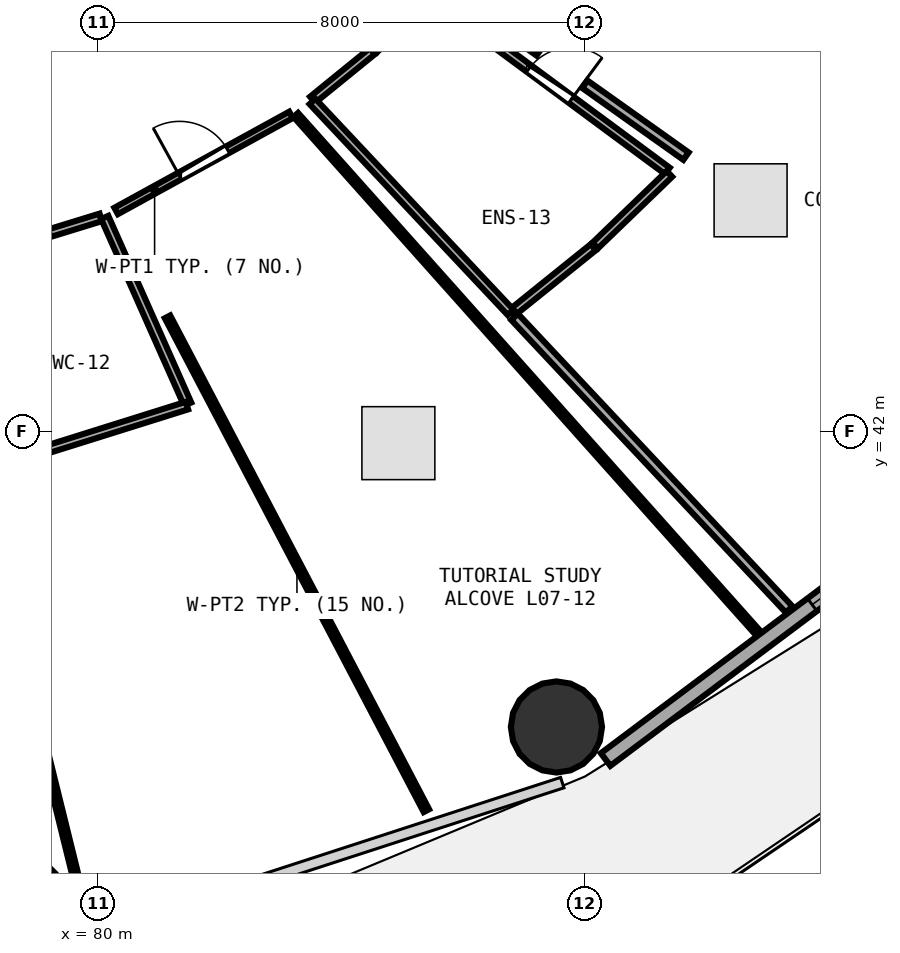
"""IFC4 building model, lengths in metres.
Left out: names, types, materials, properties, quantities, classifications, styles, units other than length and angle.
Written with IfcOpenShell. Run it as: python <this file> out.ifc"""

import sys

from ifc_helpers import new_model, si_unit, direction, frame, frame_2d, origin, origin_2d, place, context, subcontext, project, spatial, rectangle, circle, extrude, element, fill, save


model = new_model("IFC4")
c1 = context("Model", 3, precision=1e-05, world=origin(), true_north=direction((0.0, 1.0)))
c2 = subcontext(c1, "Body", "Model", "MODEL_VIEW")
j1 = project(units=[si_unit("LENGTHUNIT", "METRE"), si_unit("PLANEANGLEUNIT", "RADIAN")], contexts=[c1])
p1 = place(None, origin())
s1 = spatial("IfcSite", under=j1, at=p1, CompositionType="ELEMENT")
p2 = place(p1, origin())
s2 = spatial("IfcBuilding", under=s1, at=p2, CompositionType="ELEMENT")
p3 = place(p2, frame((0.0, 0.0, 30.0)))
s3 = spatial("IfcBuildingStorey", under=s2, at=p3, CompositionType="ELEMENT", Elevation=30.0)
for number, where, z_axis, x_axis in (
    (1, (78.702, 34.286, 0.0), (0.0, 0.0, 1.0), (1.0, 0.0, 0.0)),
    (2, (87.54, 37.146, 0.0), (0.0, 0.0, 1.0), (1.0, 0.0, 0.0)),
):
    element("IfcColumn", number, at=place(p3, frame(where, z_axis=z_axis, x_axis=x_axis)), inside=s3, PredefinedType="COLUMN", context=c2, shape_type="SweptSolid", body=[
        extrude(circle(Radius=0.75, at=origin_2d()), origin(), (0.0, 0.0, 1.0), 3.75),
    ])
p4 = place(p3, frame((88.349, 36.611, 0.0), z_axis=(0.0, 0.0, 1.0), x_axis=(0.80030733173, 0.599590005569, 0.0)))
e3 = element("IfcWall", 3, at=p4, inside=s3, PredefinedType="SOLIDWALL", context=c2, shape_type="SweptSolid", body=[
    extrude(rectangle(XDim=8.291, YDim=0.26, at=frame_2d((4.145, 0.0))), origin(), (0.0, 0.0, 1.0), 3.475),
])
p5 = place(p4, frame((4.245, 0.0, 0.85)))
e4 = element("IfcOpeningElement", 4, at=p5, cuts=e3, PredefinedType="OPENING", context=c2, shape_type="SweptSolid", body=[
    extrude(rectangle(XDim=1.6, YDim=1.45, at=frame_2d((0.8, 0.725))), frame((0.0, 0.14, 0.0), z_axis=(0.0, -1.0, 0.0), x_axis=(1.0, 0.0, 0.0)), (0.0, 0.0, 1.0), 0.28),
])
p6 = place(p3, frame((77.58, 44.768, 0.0), z_axis=(0.0, 0.0, 1.0), x_axis=(0.955754448098, 0.294165659011, 0.0)))
e5 = element("IfcWall", 5, at=p6, inside=s3, PredefinedType="PLUMBINGWALL", context=c2, shape_type="SweptSolid", body=[
    extrude(rectangle(XDim=2.579, YDim=0.13, at=frame_2d((1.29, 0.0))), origin(), (0.0, 0.0, 1.0), 3.235),
])
p7 = place(p6, frame((0.86, 0.0, 0.0)))
e6 = element("IfcOpeningElement", 6, at=p7, cuts=e5, PredefinedType="OPENING", context=c2, shape_type="SweptSolid", body=[
    extrude(rectangle(XDim=0.86, YDim=2.05, at=frame_2d((0.43, 1.025))), frame((0.0, 0.075, 0.0), z_axis=(0.0, -1.0, 0.0), x_axis=(1.0, 0.0, 0.0)), (0.0, 0.0, 1.0), 0.15),
])
p8 = place(p3, frame((80.299, 45.632, 0.0), z_axis=(0.0, 0.0, 1.0), x_axis=(0.876387079092, 0.481607399861, 0.0)))
e7 = element("IfcWall", 7, at=p8, inside=s3, PredefinedType="PARTITIONING", context=c2, shape_type="SweptSolid", body=[
    extrude(rectangle(XDim=3.281, YDim=0.12, at=frame_2d((1.641, 0.0))), origin(), (0.0, 0.0, 1.0), 2.875),
])
p9 = place(p8, frame((1.191, 0.0, 0.0)))
e8 = element("IfcOpeningElement", 8, at=p9, cuts=e7, PredefinedType="OPENING", context=c2, shape_type="SweptSolid", body=[
    extrude(rectangle(XDim=0.9, YDim=2.08, at=frame_2d((0.45, 1.04))), frame((0.0, 0.07, 0.0), z_axis=(0.0, -1.0, 0.0), x_axis=(1.0, 0.0, 0.0)), (0.0, 0.0, 1.0), 0.14),
])
p10 = place(p3, frame((85.506, 49.143, 0.0), z_axis=(0.0, 0.0, 1.0), x_axis=(0.80412644244, -0.594458295063, 0.0)))
e9 = element("IfcWall", 9, at=p10, inside=s3, PredefinedType="PLUMBINGWALL", context=c2, shape_type="SweptSolid", body=[
    extrude(rectangle(XDim=4.799, YDim=0.13, at=frame_2d((2.399, 0.0))), origin(), (0.0, 0.0, 1.0), 2.875),
])
p11 = place(p10, frame((1.969, 0.0, 0.0)))
e10 = element("IfcOpeningElement", 10, at=p11, cuts=e9, PredefinedType="OPENING", context=c2, shape_type="SweptSolid", body=[
    extrude(rectangle(XDim=0.86, YDim=2.05, at=frame_2d((0.43, 1.025))), frame((0.0, 0.075, 0.0), z_axis=(0.0, -1.0, 0.0), x_axis=(1.0, 0.0, 0.0)), (0.0, 0.0, 1.0), 0.15),
])
p12 = place(p3, frame((77.175, 44.637, 0.0), z_axis=(0.0, 0.0, 1.0), x_axis=(0.239971369295, -0.970779965759, 0.0)))
e11 = element("IfcWall", 11, at=p12, inside=s3, PredefinedType="PARTITIONING", context=c2, shape_type="SweptSolid", body=[
    extrude(rectangle(XDim=10.846, YDim=0.1, at=frame_2d((5.423, 0.0))), origin(), (0.0, 0.0, 1.0), 2.875),
])
p13 = place(p3, frame((80.111, 45.526, 0.0), z_axis=(0.0, 0.0, 1.0), x_axis=(0.405936178007, -0.913901427608, 0.0)))
e12 = element("IfcWall", 12, at=p13, inside=s3, PredefinedType="PLUMBINGWALL", context=c2, shape_type="SweptSolid", body=[
    extrude(rectangle(XDim=3.36, YDim=0.13, at=frame_2d((1.68, 0.0))), origin(), (0.0, 0.0, 1.0), 2.875),
])
p14 = place(p3, frame((81.464, 42.431, 0.0), z_axis=(0.0, 0.0, 1.0), x_axis=(-0.954175708416, -0.299246917226, 0.0)))
e13 = element("IfcWall", 13, at=p14, inside=s3, PredefinedType="PLUMBINGWALL", context=c2, shape_type="SweptSolid", body=[
    extrude(rectangle(XDim=3.275, YDim=0.13, at=frame_2d((1.637, 0.0))), origin(), (0.0, 0.0, 1.0), 2.875),
])
p15 = place(p3, frame((83.254, 47.211, 0.0), z_axis=(0.0, 0.0, 1.0), x_axis=(0.66580890104, -0.746122313897, 0.0)))
e14 = element("IfcWall", 14, at=p15, inside=s3, PredefinedType="PARTITIONING", context=c2, shape_type="SweptSolid", body=[
    extrude(rectangle(XDim=11.399, YDim=0.1, at=frame_2d((5.7, 0.0))), origin(), (0.0, 0.0, 1.0), 2.875),
])
p16 = place(p3, frame((85.401, 35.769, 0.0), z_axis=(0.0, 0.0, 1.0), x_axis=(-0.464308397246, 0.885673592384, 0.0)))
e15 = element("IfcWall", 15, at=p16, inside=s3, PredefinedType="PARTITIONING", context=c2, shape_type="SweptSolid", body=[
    extrude(rectangle(XDim=9.17, YDim=0.1, at=frame_2d((4.585, 0.0))), origin(), (0.0, 0.0, 1.0), 2.875),
])
p17 = place(p3, frame((83.53, 47.461, 0.0), z_axis=(0.0, 0.0, 1.0), x_axis=(0.77596084644, 0.63078107517, 0.0)))
e16 = element("IfcWall", 16, at=p17, inside=s3, PredefinedType="PLUMBINGWALL", context=c2, shape_type="SweptSolid", body=[
    extrude(rectangle(XDim=1.268, YDim=0.13, at=frame_2d((0.634, 0.0))), origin(), (0.0, 0.0, 1.0), 2.875),
])
p18 = place(p3, frame((84.543, 48.287, 0.0), z_axis=(0.0, 0.0, 1.0), x_axis=(0.715980731769, 0.698120041064, 0.0)))
e17 = element("IfcWall", 17, at=p18, inside=s3, PredefinedType="PLUMBINGWALL", context=c2, shape_type="SweptSolid", body=[
    extrude(rectangle(XDim=1.258, YDim=0.13, at=frame_2d((0.629, 0.0))), origin(), (0.0, 0.0, 1.0), 2.875),
])
p19 = place(p3, frame((89.399, 46.241, 0.0), z_axis=(0.0, 0.0, 1.0), x_axis=(-0.719664402118, -0.694322078234, 0.0)))
e18 = element("IfcWall", 18, at=p19, inside=s3, PredefinedType="PLUMBINGWALL", context=c2, shape_type="SweptSolid", body=[
    extrude(rectangle(XDim=1.696, YDim=0.13, at=frame_2d((0.848, 0.0))), origin(), (0.0, 0.0, 1.0), 2.875),
])
p20 = place(p3, frame((88.148, 45.038, 0.0), z_axis=(0.0, 0.0, 1.0), x_axis=(-0.778806140639, -0.627264693174, 0.0)))
e19 = element("IfcWall", 19, at=p20, inside=s3, PredefinedType="PLUMBINGWALL", context=c2, shape_type="SweptSolid", body=[
    extrude(rectangle(XDim=1.713, YDim=0.13, at=frame_2d((0.856, 0.0))), origin(), (0.0, 0.0, 1.0), 3.175),
])
p21 = place(p3, frame((86.785, 43.966, 0.0), z_axis=(0.0, 0.0, 1.0), x_axis=(-0.68469858897, 0.728826345753, 0.0)))
e20 = element("IfcWall", 20, at=p21, inside=s3, PredefinedType="PLUMBINGWALL", context=c2, shape_type="SweptSolid", body=[
    extrude(rectangle(XDim=4.758, YDim=0.13, at=frame_2d((2.379, 0.0))), origin(), (0.0, 0.0, 1.0), 2.875),
])
p22 = place(p3, frame((87.498, 51.921, 0.0), z_axis=(0.0, 0.0, 1.0), x_axis=(0.917695041134, -0.397285554077, 0.0)))
e21 = element("IfcWall", 21, at=p22, inside=s3, PredefinedType="PARTITIONING", context=c2, shape_type="SweptSolid", body=[
    extrude(rectangle(XDim=12.07, YDim=0.15, at=frame_2d((6.035, 0.0))), origin(), (0.0, 0.0, 1.0), 2.875),
])
p23 = place(p3, frame((91.368, 39.078, 0.0), z_axis=(0.0, 0.0, 1.0), x_axis=(-0.684296653493, 0.729203736975, 0.0)))
e22 = element("IfcWall", 22, at=p23, inside=s3, PredefinedType="PARTITIONING", context=c2, shape_type="SweptSolid", body=[
    extrude(rectangle(XDim=6.6, YDim=0.15, at=frame_2d((3.3, 0.0))), origin(), (0.0, 0.0, 1.0), 2.875),
])
p24 = place(p3, frame((89.671, 46.533, 0.0), z_axis=(0.0, 0.0, 1.0), x_axis=(-0.815281399299, 0.579064970411, 0.0)))
e23 = element("IfcWall", 23, at=p24, inside=s3, PredefinedType="PARTITIONING", context=c2, shape_type="SweptSolid", body=[
    extrude(rectangle(XDim=2.042, YDim=0.15, at=frame_2d((1.021, 0.0))), origin(), (0.0, 0.0, 1.0), 3.48),
])
p25 = place(p3, frame((87.256, 48.249, 0.0), z_axis=(0.0, 0.0, 1.0), x_axis=(-0.815270043711, 0.579080957922, 0.0)))
e24 = element("IfcWall", 24, at=p25, inside=s3, PredefinedType="PARTITIONING", context=c2, shape_type="SweptSolid", body=[
    extrude(rectangle(XDim=1.929, YDim=0.15, at=frame_2d((0.964, 0.0))), origin(), (0.0, 0.0, 1.0), 3.235),
])
p26 = place(p5, origin())
e25 = element("IfcWindow", 25, at=p26, inside=s3, PartitioningType="SINGLE_PANEL", PredefinedType="WINDOW", context=c2, shape_type="SweptSolid", body=[
    extrude(rectangle(XDim=1.6, YDim=1.45, at=frame_2d((0.8, 0.725))), frame((0.0, 0.03, 0.0), z_axis=(0.0, -1.0, 0.0), x_axis=(1.0, 0.0, 0.0)), (0.0, 0.0, 1.0), 0.06),
])
fill(e4, e25)
p27 = place(p9, origin())
e26 = element("IfcDoor", 26, at=p27, inside=s3, OperationType="SINGLE_SWING_LEFT", PredefinedType="DOOR", context=c2, shape_type="SweptSolid", body=[
    extrude(rectangle(XDim=0.9, YDim=2.08, at=frame_2d((0.45, 1.04))), frame((0.0, 0.025, 0.0), z_axis=(0.0, -1.0, 0.0), x_axis=(1.0, 0.0, 0.0)), (0.0, 0.0, 1.0), 0.05),
])
fill(e8, e26)
p28 = place(p11, origin())
e27 = element("IfcDoor", 27, at=p28, inside=s3, OperationType="SINGLE_SWING_RIGHT", PredefinedType="DOOR", context=c2, shape_type="SweptSolid", body=[
    extrude(rectangle(XDim=0.86, YDim=2.05, at=frame_2d((0.43, 1.025))), frame((0.0, 0.025, 0.0), z_axis=(0.0, -1.0, 0.0), x_axis=(1.0, 0.0, 0.0)), (0.0, 0.0, 1.0), 0.05),
])
fill(e10, e27)
save(model, sys.argv[1])
